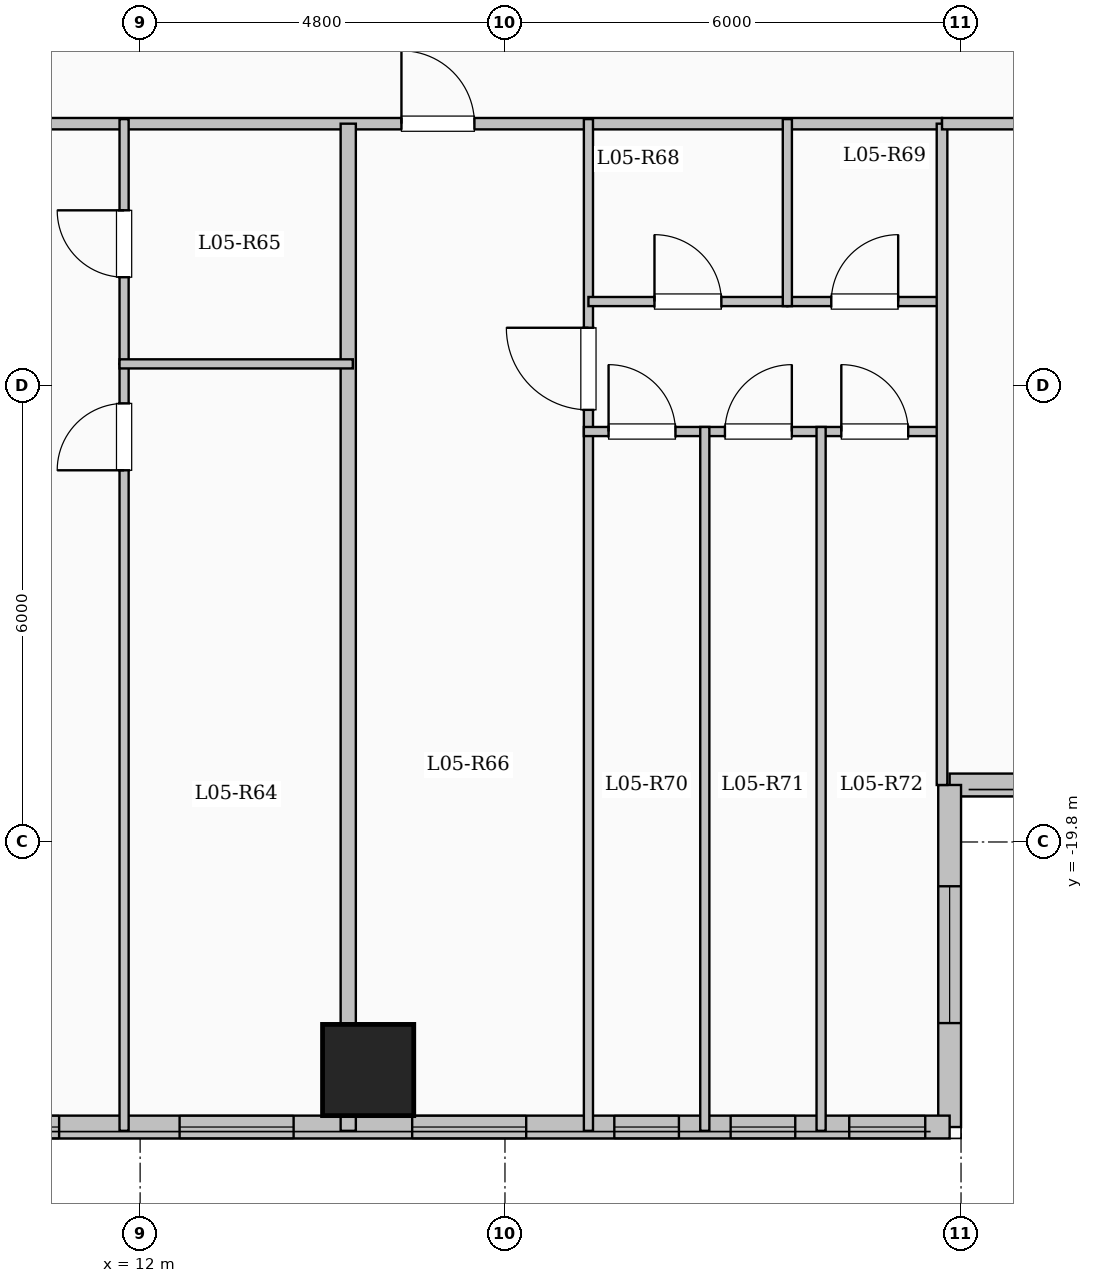
"""IFC4 building model, lengths in metres.
Left out: names, types, materials, properties, quantities, classifications, styles, units other than length and angle.
Written with IfcOpenShell. Run it as: python <this file> out.ifc"""

import sys

from ifc_helpers import new_model, si_unit, direction, frame, frame_2d, origin, origin_2d, place, context, subcontext, project, spatial, rectangle, extrude, element, fill, save


model = new_model("IFC4")
c1 = context("Model", 3, precision=1e-05, world=origin(), true_north=direction((0.0, 1.0)))
c2 = subcontext(c1, "Body", "Model", "MODEL_VIEW")
j1 = project(units=[si_unit("LENGTHUNIT", "METRE"), si_unit("PLANEANGLEUNIT", "RADIAN")], contexts=[c1])
p1 = place(None, origin())
s1 = spatial("IfcSite", under=j1, at=p1, CompositionType="ELEMENT")
p2 = place(p1, origin())
s2 = spatial("IfcBuilding", under=s1, at=p2, CompositionType="ELEMENT")
p3 = place(p2, frame((0.0, 0.0, 24.0)))
s3 = spatial("IfcBuildingStorey", under=s2, at=p3, CompositionType="ELEMENT", Elevation=24.0)
p4 = place(p3, frame((15.0, -22.8, 0.0), z_axis=(0.0, 0.0, 1.0), x_axis=(1.0, 0.0, 0.0)))
e1 = element("IfcColumn", 1, at=p4, inside=s3, PredefinedType="COLUMN", context=c2, shape_type="SweptSolid", body=[
    extrude(rectangle(XDim=1.2, YDim=1.2, at=origin_2d()), origin(), (0.0, 0.0, 1.0), 3.35),
])
p5 = place(p3, frame((28.65, -19.05, 0.0), z_axis=(0.0, 0.0, 1.0), x_axis=(-1.0, 0.0, 0.0)))
e2 = element("IfcWall", 2, at=p5, inside=s3, PredefinedType="SOLIDWALL", context=c2, shape_type="SweptSolid", body=[
    extrude(rectangle(XDim=6.0, YDim=0.3, at=frame_2d((3.0, 0.0))), origin(), (0.0, 0.0, 1.0), 3.1),
])
p6 = place(p5, frame((1.825, 0.0, 0.9)))
e3 = element("IfcOpeningElement", 3, at=p6, cuts=e2, PredefinedType="OPENING", context=c2, shape_type="SweptSolid", body=[
    extrude(rectangle(XDim=2.4, YDim=1.8, at=frame_2d((1.2, 0.9))), frame((0.0, 0.16, 0.0), z_axis=(0.0, -1.0, 0.0), x_axis=(1.0, 0.0, 0.0)), (0.0, 0.0, 1.0), 0.32),
])
p7 = place(p3, frame((22.65, -19.05, 0.0), z_axis=(0.0, 0.0, 1.0), x_axis=(0.0, -1.0, 0.0)))
e4 = element("IfcWall", 4, at=p7, inside=s3, PredefinedType="SOLIDWALL", context=c2, shape_type="SweptSolid", body=[
    extrude(rectangle(XDim=4.5, YDim=0.3, at=frame_2d((2.25, 0.0))), origin(), (0.0, 0.0, 1.0), 3.1),
])
p8 = place(p7, frame((1.333, 0.0, 0.9)))
e5 = element("IfcOpeningElement", 5, at=p8, cuts=e4, PredefinedType="OPENING", context=c2, shape_type="SweptSolid", body=[
    extrude(rectangle(XDim=1.8, YDim=1.65, at=frame_2d((0.9, 0.825))), frame((0.0, 0.16, 0.0), z_axis=(0.0, -1.0, 0.0), x_axis=(1.0, 0.0, 0.0)), (0.0, 0.0, 1.0), 0.32),
])
p9 = place(p3, frame((22.65, -23.55, 0.0), z_axis=(0.0, 0.0, 1.0), x_axis=(-1.0, 0.0, 0.0)))
e6 = element("IfcWall", 6, at=p9, inside=s3, PredefinedType="SOLIDWALL", context=c2, shape_type="SweptSolid", body=[
    extrude(rectangle(XDim=15.3, YDim=0.3, at=frame_2d((7.65, 0.0))), origin(), (0.0, 0.0, 1.0), 3.1),
])
p10 = place(p9, frame((0.321, 0.0, 0.95)))
e7 = element("IfcOpeningElement", 7, at=p10, cuts=e6, PredefinedType="OPENING", context=c2, shape_type="SweptSolid", body=[
    extrude(rectangle(XDim=1.0, YDim=1.5, at=frame_2d((0.5, 0.75))), frame((0.0, 0.16, 0.0), z_axis=(0.0, -1.0, 0.0), x_axis=(1.0, 0.0, 0.0)), (0.0, 0.0, 1.0), 0.32),
])
p11 = place(p9, frame((2.031, 0.0, 0.95)))
e8 = element("IfcOpeningElement", 8, at=p11, cuts=e6, PredefinedType="OPENING", context=c2, shape_type="SweptSolid", body=[
    extrude(rectangle(XDim=0.85, YDim=1.5, at=frame_2d((0.425, 0.75))), frame((0.0, 0.16, 0.0), z_axis=(0.0, -1.0, 0.0), x_axis=(1.0, 0.0, 0.0)), (0.0, 0.0, 1.0), 0.32),
])
p12 = place(p9, frame((3.562, 0.0, 0.95)))
e9 = element("IfcOpeningElement", 9, at=p12, cuts=e6, PredefinedType="OPENING", context=c2, shape_type="SweptSolid", body=[
    extrude(rectangle(XDim=0.85, YDim=1.5, at=frame_2d((0.425, 0.75))), frame((0.0, 0.16, 0.0), z_axis=(0.0, -1.0, 0.0), x_axis=(1.0, 0.0, 0.0)), (0.0, 0.0, 1.0), 0.32),
])
p13 = place(p9, frame((5.571, 0.0, 0.9)))
e10 = element("IfcOpeningElement", 10, at=p13, cuts=e6, PredefinedType="OPENING", context=c2, shape_type="SweptSolid", body=[
    extrude(rectangle(XDim=1.5, YDim=1.65, at=frame_2d((0.75, 0.825))), frame((0.0, 0.16, 0.0), z_axis=(0.0, -1.0, 0.0), x_axis=(1.0, 0.0, 0.0)), (0.0, 0.0, 1.0), 0.32),
])
p14 = place(p9, frame((8.631, 0.0, 0.9)))
e11 = element("IfcOpeningElement", 11, at=p14, cuts=e6, PredefinedType="OPENING", context=c2, shape_type="SweptSolid", body=[
    extrude(rectangle(XDim=1.5, YDim=1.65, at=frame_2d((0.75, 0.825))), frame((0.0, 0.16, 0.0), z_axis=(0.0, -1.0, 0.0), x_axis=(1.0, 0.0, 0.0)), (0.0, 0.0, 1.0), 0.32),
])
p15 = place(p9, frame((11.716, 0.0, 0.9)))
e12 = element("IfcOpeningElement", 12, at=p15, cuts=e6, PredefinedType="OPENING", context=c2, shape_type="SweptSolid", body=[
    extrude(rectangle(XDim=1.5, YDim=1.65, at=frame_2d((0.75, 0.825))), frame((0.0, 0.16, 0.0), z_axis=(0.0, -1.0, 0.0), x_axis=(1.0, 0.0, 0.0)), (0.0, 0.0, 1.0), 0.32),
])
p16 = place(p9, frame((14.303, 0.0, 0.95)))
e13 = element("IfcOpeningElement", 13, at=p16, cuts=e6, PredefinedType="OPENING", context=c2, shape_type="SweptSolid", body=[
    extrude(rectangle(XDim=0.85, YDim=1.5, at=frame_2d((0.425, 0.75))), frame((0.0, 0.16, 0.0), z_axis=(0.0, -1.0, 0.0), x_axis=(1.0, 0.0, 0.0)), (0.0, 0.0, 1.0), 0.32),
])
p17 = place(p3, frame((8.55, -10.35, 0.0), z_axis=(0.0, 0.0, 1.0), x_axis=(1.0, 0.0, 0.0)))
e14 = element("IfcWall", 14, at=p17, inside=s3, PredefinedType="PARTITIONING", context=c2, shape_type="SweptSolid", body=[
    extrude(rectangle(XDim=14.0, YDim=0.15, at=frame_2d((7.0, 0.0))), origin(), (0.0, 0.0, 1.0), 3.1),
])
p18 = place(p17, frame((0.75, 0.0, 0.0)))
e15 = element("IfcOpeningElement", 15, at=p18, cuts=e14, PredefinedType="OPENING", context=c2, shape_type="SweptSolid", body=[
    extrude(rectangle(XDim=0.96, YDim=2.15, at=frame_2d((0.48, 1.075))), frame((0.0, 0.085, 0.0), z_axis=(0.0, -1.0, 0.0), x_axis=(1.0, 0.0, 0.0)), (0.0, 0.0, 1.0), 0.17),
])
p19 = place(p17, frame((6.888, 0.0, 0.0)))
e16 = element("IfcOpeningElement", 16, at=p19, cuts=e14, PredefinedType="OPENING", context=c2, shape_type="SweptSolid", body=[
    extrude(rectangle(XDim=0.96, YDim=2.15, at=frame_2d((0.48, 1.075))), frame((0.0, 0.085, 0.0), z_axis=(0.0, -1.0, 0.0), x_axis=(1.0, 0.0, 0.0)), (0.0, 0.0, 1.0), 0.17),
])
p20 = place(p3, frame((14.738, -23.6, 0.0), z_axis=(0.0, 0.0, 1.0), x_axis=(0.0, 1.0, 0.0)))
e17 = element("IfcWall", 17, at=p20, inside=s3, PredefinedType="SOLIDWALL", context=c2, shape_type="SweptSolid", body=[
    extrude(rectangle(XDim=13.25, YDim=0.2, at=frame_2d((6.625, 0.0))), origin(), (0.0, 0.0, 1.0), 2.435),
])
p21 = place(p3, frame((11.789, -23.6, 0.0), z_axis=(0.0, 0.0, 1.0), x_axis=(0.0, 1.0, 0.0)))
e18 = element("IfcWall", 18, at=p21, inside=s3, PredefinedType="PARTITIONING", context=c2, shape_type="SweptSolid", body=[
    extrude(rectangle(XDim=10.09, YDim=0.12, at=frame_2d((5.045, 0.0))), origin(), (0.0, 0.0, 1.0), 3.1),
])
p22 = place(p21, frame((8.69, 0.0, 0.0)))
e19 = element("IfcOpeningElement", 19, at=p22, cuts=e18, PredefinedType="OPENING", context=c2, shape_type="SweptSolid", body=[
    extrude(rectangle(XDim=0.88, YDim=2.1, at=frame_2d((0.44, 1.05))), frame((0.0, 0.07, 0.0), z_axis=(0.0, -1.0, 0.0), x_axis=(1.0, 0.0, 0.0)), (0.0, 0.0, 1.0), 0.14),
])
p23 = place(p3, frame((11.789, -13.51, 0.0), z_axis=(0.0, 0.0, 1.0), x_axis=(0.0, 1.0, 0.0)))
e20 = element("IfcWall", 20, at=p23, inside=s3, PredefinedType="PARTITIONING", context=c2, shape_type="SweptSolid", body=[
    extrude(rectangle(XDim=3.22, YDim=0.12, at=frame_2d((1.61, 0.0))), origin(), (0.0, 0.0, 1.0), 3.1),
])
p24 = place(p23, frame((1.14, 0.0, 0.0)))
e21 = element("IfcOpeningElement", 21, at=p24, cuts=e20, PredefinedType="OPENING", context=c2, shape_type="SweptSolid", body=[
    extrude(rectangle(XDim=0.88, YDim=2.1, at=frame_2d((0.44, 1.05))), frame((0.0, 0.07, 0.0), z_axis=(0.0, -1.0, 0.0), x_axis=(1.0, 0.0, 0.0)), (0.0, 0.0, 1.0), 0.14),
])
p25 = place(p3, frame((11.729, -13.51, 0.0), z_axis=(0.0, 0.0, 1.0), x_axis=(1.0, 0.0, 0.0)))
e22 = element("IfcWall", 22, at=p25, inside=s3, PredefinedType="PARTITIONING", context=c2, shape_type="SweptSolid", body=[
    extrude(rectangle(XDim=3.069, YDim=0.12, at=frame_2d((1.535, 0.0))), origin(), (0.0, 0.0, 1.0), 3.1),
])
p26 = place(p3, frame((17.898, -23.6, 0.0), z_axis=(0.0, 0.0, 1.0), x_axis=(0.0, 1.0, 0.0)))
e23 = element("IfcWall", 23, at=p26, inside=s3, PredefinedType="PARTITIONING", context=c2, shape_type="SweptSolid", body=[
    extrude(rectangle(XDim=13.31, YDim=0.12, at=frame_2d((6.655, 0.0))), origin(), (0.0, 0.0, 1.0), 3.1),
])
p27 = place(p26, frame((9.485, 0.0, 0.0)))
e24 = element("IfcOpeningElement", 24, at=p27, cuts=e23, PredefinedType="OPENING", context=c2, shape_type="SweptSolid", body=[
    extrude(rectangle(XDim=1.08, YDim=2.15, at=frame_2d((0.54, 1.075))), frame((0.0, 0.07, 0.0), z_axis=(0.0, -1.0, 0.0), x_axis=(1.0, 0.0, 0.0)), (0.0, 0.0, 1.0), 0.14),
])
p28 = place(p3, frame((17.898, -12.69, 0.0), z_axis=(0.0, 0.0, 1.0), x_axis=(1.0, 0.0, 0.0)))
e25 = element("IfcWall", 25, at=p28, inside=s3, PredefinedType="PARTITIONING", context=c2, shape_type="SweptSolid", body=[
    extrude(rectangle(XDim=2.617, YDim=0.12, at=frame_2d((1.309, 0.0))), origin(), (0.0, 0.0, 1.0), 3.1),
])
p29 = place(p28, frame((0.869, 0.0, 0.0)))
e26 = element("IfcOpeningElement", 26, at=p29, cuts=e25, PredefinedType="OPENING", context=c2, shape_type="SweptSolid", body=[
    extrude(rectangle(XDim=0.88, YDim=2.1, at=frame_2d((0.44, 1.05))), frame((0.0, 0.07, 0.0), z_axis=(0.0, -1.0, 0.0), x_axis=(1.0, 0.0, 0.0)), (0.0, 0.0, 1.0), 0.14),
])
p30 = place(p3, frame((20.515, -12.69, 0.0), z_axis=(0.0, 0.0, 1.0), x_axis=(1.0, 0.0, 0.0)))
e27 = element("IfcWall", 27, at=p30, inside=s3, PredefinedType="PARTITIONING", context=c2, shape_type="SweptSolid", body=[
    extrude(rectangle(XDim=2.035, YDim=0.12, at=frame_2d((1.018, 0.0))), origin(), (0.0, 0.0, 1.0), 3.1),
])
p31 = place(p30, frame((0.578, 0.0, 0.0)))
e28 = element("IfcOpeningElement", 28, at=p31, cuts=e27, PredefinedType="OPENING", context=c2, shape_type="SweptSolid", body=[
    extrude(rectangle(XDim=0.88, YDim=2.1, at=frame_2d((0.44, 1.05))), frame((0.0, 0.07, 0.0), z_axis=(0.0, -1.0, 0.0), x_axis=(1.0, 0.0, 0.0)), (0.0, 0.0, 1.0), 0.14),
])
p32 = place(p3, frame((17.838, -14.4, 0.0), z_axis=(0.0, 0.0, 1.0), x_axis=(1.0, 0.0, 0.0)))
e29 = element("IfcWall", 29, at=p32, inside=s3, PredefinedType="PARTITIONING", context=c2, shape_type="SweptSolid", body=[
    extrude(rectangle(XDim=4.772, YDim=0.12, at=frame_2d((2.386, 0.0))), origin(), (0.0, 0.0, 1.0), 3.1),
])
p33 = place(p32, frame((0.325, 0.0, 0.0)))
e30 = element("IfcOpeningElement", 30, at=p33, cuts=e29, PredefinedType="OPENING", context=c2, shape_type="SweptSolid", body=[
    extrude(rectangle(XDim=0.88, YDim=2.1, at=frame_2d((0.44, 1.05))), frame((0.0, 0.07, 0.0), z_axis=(0.0, -1.0, 0.0), x_axis=(1.0, 0.0, 0.0)), (0.0, 0.0, 1.0), 0.14),
])
p34 = place(p32, frame((1.856, 0.0, 0.0)))
e31 = element("IfcOpeningElement", 31, at=p34, cuts=e29, PredefinedType="OPENING", context=c2, shape_type="SweptSolid", body=[
    extrude(rectangle(XDim=0.88, YDim=2.1, at=frame_2d((0.44, 1.05))), frame((0.0, 0.07, 0.0), z_axis=(0.0, -1.0, 0.0), x_axis=(1.0, 0.0, 0.0)), (0.0, 0.0, 1.0), 0.14),
])
p35 = place(p32, frame((3.387, 0.0, 0.0)))
e32 = element("IfcOpeningElement", 32, at=p35, cuts=e29, PredefinedType="OPENING", context=c2, shape_type="SweptSolid", body=[
    extrude(rectangle(XDim=0.88, YDim=2.1, at=frame_2d((0.44, 1.05))), frame((0.0, 0.07, 0.0), z_axis=(0.0, -1.0, 0.0), x_axis=(1.0, 0.0, 0.0)), (0.0, 0.0, 1.0), 0.14),
])
p36 = place(p3, frame((20.515, -12.75, 0.0), z_axis=(0.0, 0.0, 1.0), x_axis=(0.0, 1.0, 0.0)))
e33 = element("IfcWall", 33, at=p36, inside=s3, PredefinedType="PARTITIONING", context=c2, shape_type="SweptSolid", body=[
    extrude(rectangle(XDim=2.46, YDim=0.12, at=frame_2d((1.23, 0.0))), origin(), (0.0, 0.0, 1.0), 3.1),
])
for number, where, z_axis, x_axis in (
    (34, (19.429, -23.6, 0.0), (0.0, 0.0, 1.0), (0.0, 1.0, 0.0)),
    (35, (20.959, -23.6, 0.0), (0.0, 0.0, 1.0), (0.0, 1.0, 0.0)),
):
    element("IfcWall", number, at=place(p3, frame(where, z_axis=z_axis, x_axis=x_axis)), inside=s3, PredefinedType="PARTITIONING", context=c2, shape_type="SweptSolid", body=[
        extrude(rectangle(XDim=9.26, YDim=0.12, at=frame_2d((4.63, 0.0))), origin(), (0.0, 0.0, 1.0), 3.1),
    ])
p37 = place(p3, frame((22.55, -19.05, 0.0), z_axis=(0.0, 0.0, 1.0), x_axis=(0.0, 1.0, 0.0)))
e36 = element("IfcWall", 36, at=p37, inside=s3, PredefinedType="PARTITIONING", context=c2, shape_type="SweptSolid", body=[
    extrude(rectangle(XDim=8.7, YDim=0.14, at=frame_2d((4.35, 0.0))), origin(), (0.0, 0.0, 1.0), 3.1),
])
p38 = place(p3, frame((22.55, -10.35, 0.0), z_axis=(0.0, 0.0, 1.0), x_axis=(1.0, 0.0, 0.0)))
e37 = element("IfcWall", 37, at=p38, inside=s3, PredefinedType="PARTITIONING", context=c2, shape_type="SweptSolid", body=[
    extrude(rectangle(XDim=6.13, YDim=0.15, at=frame_2d((3.065, 0.0))), origin(), (0.0, 0.0, 1.0), 3.1),
])
p39 = place(p38, frame((2.59, 0.0, 0.0)))
e38 = element("IfcOpeningElement", 38, at=p39, cuts=e37, PredefinedType="OPENING", context=c2, shape_type="SweptSolid", body=[
    extrude(rectangle(XDim=0.95, YDim=2.15, at=frame_2d((0.475, 1.075))), frame((0.0, 0.085, 0.0), z_axis=(0.0, -1.0, 0.0), x_axis=(1.0, 0.0, 0.0)), (0.0, 0.0, 1.0), 0.17),
])
p40 = place(p8, origin())
e39 = element("IfcWindow", 39, at=p40, inside=s3, PartitioningType="SINGLE_PANEL", PredefinedType="WINDOW", context=c2, shape_type="SweptSolid", body=[
    extrude(rectangle(XDim=1.8, YDim=1.65, at=frame_2d((0.9, 0.825))), frame((0.0, 0.03, 0.0), z_axis=(0.0, -1.0, 0.0), x_axis=(1.0, 0.0, 0.0)), (0.0, 0.0, 1.0), 0.06),
])
fill(e5, e39)
p41 = place(p10, origin())
e40 = element("IfcWindow", 40, at=p41, inside=s3, PartitioningType="SINGLE_PANEL", PredefinedType="WINDOW", context=c2, shape_type="SweptSolid", body=[
    extrude(rectangle(XDim=1.0, YDim=1.5, at=frame_2d((0.5, 0.75))), frame((0.0, 0.03, 0.0), z_axis=(0.0, -1.0, 0.0), x_axis=(1.0, 0.0, 0.0)), (0.0, 0.0, 1.0), 0.06),
])
fill(e7, e40)
p42 = place(p11, origin())
e41 = element("IfcWindow", 41, at=p42, inside=s3, PartitioningType="SINGLE_PANEL", PredefinedType="WINDOW", context=c2, shape_type="SweptSolid", body=[
    extrude(rectangle(XDim=0.85, YDim=1.5, at=frame_2d((0.425, 0.75))), frame((0.0, 0.03, 0.0), z_axis=(0.0, -1.0, 0.0), x_axis=(1.0, 0.0, 0.0)), (0.0, 0.0, 1.0), 0.06),
])
fill(e8, e41)
p43 = place(p12, origin())
e42 = element("IfcWindow", 42, at=p43, inside=s3, PartitioningType="SINGLE_PANEL", PredefinedType="WINDOW", context=c2, shape_type="SweptSolid", body=[
    extrude(rectangle(XDim=0.85, YDim=1.5, at=frame_2d((0.425, 0.75))), frame((0.0, 0.03, 0.0), z_axis=(0.0, -1.0, 0.0), x_axis=(1.0, 0.0, 0.0)), (0.0, 0.0, 1.0), 0.06),
])
fill(e9, e42)
p44 = place(p13, origin())
e43 = element("IfcWindow", 43, at=p44, inside=s3, PartitioningType="SINGLE_PANEL", PredefinedType="WINDOW", context=c2, shape_type="SweptSolid", body=[
    extrude(rectangle(XDim=1.5, YDim=1.65, at=frame_2d((0.75, 0.825))), frame((0.0, 0.03, 0.0), z_axis=(0.0, -1.0, 0.0), x_axis=(1.0, 0.0, 0.0)), (0.0, 0.0, 1.0), 0.06),
])
fill(e10, e43)
p45 = place(p14, origin())
e44 = element("IfcWindow", 44, at=p45, inside=s3, PartitioningType="SINGLE_PANEL", PredefinedType="WINDOW", context=c2, shape_type="SweptSolid", body=[
    extrude(rectangle(XDim=1.5, YDim=1.65, at=frame_2d((0.75, 0.825))), frame((0.0, 0.03, 0.0), z_axis=(0.0, -1.0, 0.0), x_axis=(1.0, 0.0, 0.0)), (0.0, 0.0, 1.0), 0.06),
])
fill(e11, e44)
p46 = place(p15, origin())
e45 = element("IfcWindow", 45, at=p46, inside=s3, PartitioningType="SINGLE_PANEL", PredefinedType="WINDOW", context=c2, shape_type="SweptSolid", body=[
    extrude(rectangle(XDim=1.5, YDim=1.65, at=frame_2d((0.75, 0.825))), frame((0.0, 0.03, 0.0), z_axis=(0.0, -1.0, 0.0), x_axis=(1.0, 0.0, 0.0)), (0.0, 0.0, 1.0), 0.06),
])
fill(e12, e45)
p47 = place(p22, origin())
e46 = element("IfcDoor", 46, at=p47, inside=s3, OperationType="SINGLE_SWING_LEFT", PredefinedType="DOOR", context=c2, shape_type="SweptSolid", body=[
    extrude(rectangle(XDim=0.88, YDim=2.1, at=frame_2d((0.44, 1.05))), frame((0.0, 0.025, 0.0), z_axis=(0.0, -1.0, 0.0), x_axis=(1.0, 0.0, 0.0)), (0.0, 0.0, 1.0), 0.05),
])
fill(e19, e46)
p48 = place(p24, origin())
e47 = element("IfcDoor", 47, at=p48, inside=s3, OperationType="SINGLE_SWING_RIGHT", PredefinedType="DOOR", context=c2, shape_type="SweptSolid", body=[
    extrude(rectangle(XDim=0.88, YDim=2.1, at=frame_2d((0.44, 1.05))), frame((0.0, 0.025, 0.0), z_axis=(0.0, -1.0, 0.0), x_axis=(1.0, 0.0, 0.0)), (0.0, 0.0, 1.0), 0.05),
])
fill(e21, e47)
p49 = place(p19, origin())
e48 = element("IfcDoor", 48, at=p49, inside=s3, OperationType="SINGLE_SWING_LEFT", PredefinedType="DOOR", context=c2, shape_type="SweptSolid", body=[
    extrude(rectangle(XDim=0.96, YDim=2.15, at=frame_2d((0.48, 1.075))), frame((0.0, 0.025, 0.0), z_axis=(0.0, -1.0, 0.0), x_axis=(1.0, 0.0, 0.0)), (0.0, 0.0, 1.0), 0.05),
])
fill(e16, e48)
p50 = place(p27, origin())
e49 = element("IfcDoor", 49, at=p50, inside=s3, OperationType="SINGLE_SWING_RIGHT", PredefinedType="DOOR", context=c2, shape_type="SweptSolid", body=[
    extrude(rectangle(XDim=1.08, YDim=2.15, at=frame_2d((0.54, 1.075))), frame((0.0, 0.025, 0.0), z_axis=(0.0, -1.0, 0.0), x_axis=(1.0, 0.0, 0.0)), (0.0, 0.0, 1.0), 0.05),
])
fill(e24, e49)
p51 = place(p29, origin())
e50 = element("IfcDoor", 50, at=p51, inside=s3, OperationType="SINGLE_SWING_LEFT", PredefinedType="DOOR", context=c2, shape_type="SweptSolid", body=[
    extrude(rectangle(XDim=0.88, YDim=2.1, at=frame_2d((0.44, 1.05))), frame((0.0, 0.025, 0.0), z_axis=(0.0, -1.0, 0.0), x_axis=(1.0, 0.0, 0.0)), (0.0, 0.0, 1.0), 0.05),
])
fill(e26, e50)
p52 = place(p31, origin())
e51 = element("IfcDoor", 51, at=p52, inside=s3, OperationType="SINGLE_SWING_RIGHT", PredefinedType="DOOR", context=c2, shape_type="SweptSolid", body=[
    extrude(rectangle(XDim=0.88, YDim=2.1, at=frame_2d((0.44, 1.05))), frame((0.0, 0.025, 0.0), z_axis=(0.0, -1.0, 0.0), x_axis=(1.0, 0.0, 0.0)), (0.0, 0.0, 1.0), 0.05),
])
fill(e28, e51)
p53 = place(p33, origin())
e52 = element("IfcDoor", 52, at=p53, inside=s3, OperationType="SINGLE_SWING_LEFT", PredefinedType="DOOR", context=c2, shape_type="SweptSolid", body=[
    extrude(rectangle(XDim=0.88, YDim=2.1, at=frame_2d((0.44, 1.05))), frame((0.0, 0.025, 0.0), z_axis=(0.0, -1.0, 0.0), x_axis=(1.0, 0.0, 0.0)), (0.0, 0.0, 1.0), 0.05),
])
fill(e30, e52)
p54 = place(p34, origin())
e53 = element("IfcDoor", 53, at=p54, inside=s3, OperationType="SINGLE_SWING_RIGHT", PredefinedType="DOOR", context=c2, shape_type="SweptSolid", body=[
    extrude(rectangle(XDim=0.88, YDim=2.1, at=frame_2d((0.44, 1.05))), frame((0.0, 0.025, 0.0), z_axis=(0.0, -1.0, 0.0), x_axis=(1.0, 0.0, 0.0)), (0.0, 0.0, 1.0), 0.05),
])
fill(e31, e53)
p55 = place(p35, origin())
e54 = element("IfcDoor", 54, at=p55, inside=s3, OperationType="SINGLE_SWING_LEFT", PredefinedType="DOOR", context=c2, shape_type="SweptSolid", body=[
    extrude(rectangle(XDim=0.88, YDim=2.1, at=frame_2d((0.44, 1.05))), frame((0.0, 0.025, 0.0), z_axis=(0.0, -1.0, 0.0), x_axis=(1.0, 0.0, 0.0)), (0.0, 0.0, 1.0), 0.05),
])
fill(e32, e54)
save(model, sys.argv[1])
